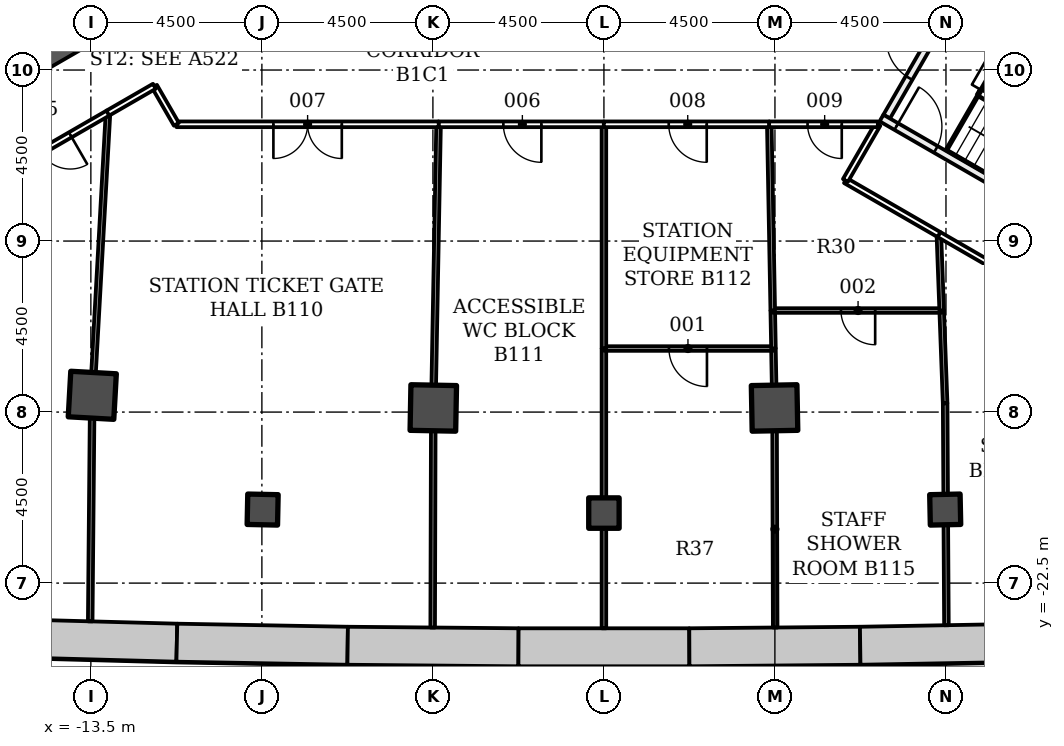
"""IFC4 building model, lengths in metres.
Left out: names, types, materials, properties, quantities, classifications, styles, units other than length and angle.
Written with IfcOpenShell. Run it as: python <this file> out.ifc"""

import sys

from ifc_helpers import new_model, si_unit, direction, frame, frame_2d, origin, origin_2d, place, context, subcontext, project, spatial, polyline, rectangle, outline, extrude, element, fill, save


model = new_model("IFC4")
c1 = context("Model", 3, precision=1e-05, world=origin(), true_north=direction((0.0, 1.0)))
c2 = subcontext(c1, "Body", "Model", "MODEL_VIEW")
j1 = project(units=[si_unit("LENGTHUNIT", "METRE"), si_unit("PLANEANGLEUNIT", "RADIAN")], contexts=[c1])
p1 = place(None, origin())
s1 = spatial("IfcSite", under=j1, at=p1, CompositionType="ELEMENT")
p2 = place(p1, origin())
s2 = spatial("IfcBuilding", under=s1, at=p2, CompositionType="ELEMENT")
p3 = place(p2, frame((0.0, 0.0, -4.5)))
s3 = spatial("IfcBuildingStorey", under=s2, at=p3, CompositionType="ELEMENT", Elevation=-4.5)
p4 = place(p3, origin())
e1 = element("IfcWall", 1, at=p4, inside=s3, PredefinedType="SOLIDWALL", context=c2, shape_type="SweptSolid", body=[
    extrude(outline(polyline([(-15.747, -24.446), (-11.249, -24.568), (-11.227, -23.568), (-15.716, -23.447), (-15.747, -24.446)])), origin(), (0.0, 0.0, 1.0), 4.25),
])
p5 = place(p3, origin())
e2 = element("IfcWall", 2, at=p5, inside=s3, PredefinedType="SOLIDWALL", context=c2, shape_type="SweptSolid", body=[
    extrude(outline(polyline([(-11.249, -24.568), (-6.75, -24.648), (-6.736, -23.649), (-11.227, -23.568), (-11.249, -24.568)])), origin(), (0.0, 0.0, 1.0), 4.25),
])
p6 = place(p3, origin())
e3 = element("IfcWall", 3, at=p6, inside=s3, PredefinedType="SOLIDWALL", context=c2, shape_type="SweptSolid", body=[
    extrude(outline(polyline([(-6.75, -24.648), (-2.25, -24.689), (-2.246, -23.689), (-6.736, -23.649), (-6.75, -24.648)])), origin(), (0.0, 0.0, 1.0), 4.25),
])
p7 = place(p3, origin())
e4 = element("IfcWall", 4, at=p7, inside=s3, PredefinedType="SOLIDWALL", context=c2, shape_type="SweptSolid", body=[
    extrude(outline(polyline([(-2.25, -24.689), (2.25, -24.689), (2.246, -23.689), (-2.246, -23.689), (-2.25, -24.689)])), origin(), (0.0, 0.0, 1.0), 4.25),
])
p8 = place(p3, origin())
e5 = element("IfcWall", 5, at=p8, inside=s3, PredefinedType="SOLIDWALL", context=c2, shape_type="SweptSolid", body=[
    extrude(outline(polyline([(2.25, -24.689), (6.75, -24.648), (6.736, -23.649), (2.246, -23.689), (2.25, -24.689)])), origin(), (0.0, 0.0, 1.0), 4.25),
])
p9 = place(p3, origin())
e6 = element("IfcWall", 6, at=p9, inside=s3, PredefinedType="SOLIDWALL", context=c2, shape_type="SweptSolid", body=[
    extrude(outline(polyline([(6.75, -24.648), (11.249, -24.568), (11.227, -23.568), (6.736, -23.649), (6.75, -24.648)])), origin(), (0.0, 0.0, 1.0), 4.25),
])
for number, where, z_axis, x_axis in (
    (7, (-13.462, -17.558, -0.3), (0.0, 0.0, 1.0), (-0.056, -0.998, 0.0)),
    (8, (-4.49, -17.892, -0.3), (0.0, 0.0, 1.0), (-0.019, -1.0, 0.0)),
    (9, (4.49, -17.892, -0.3), (0.0, 0.0, 1.0), (0.019, -1.0, 0.0)),
):
    element("IfcColumn", number, at=place(p3, frame(where, z_axis=z_axis, x_axis=x_axis)), inside=s3, PredefinedType="COLUMN", context=c2, shape_type="SweptSolid", body=[
        extrude(rectangle(XDim=1.2, YDim=1.2, at=origin_2d()), origin(), (0.0, 0.0, 1.0), 4.55),
    ])
for number, where, z_axis, x_axis in (
    (10, (-8.98, -20.565, -0.3), (0.0, 0.0, 1.0), (-0.021, -1.0, 0.0)),
    (11, (0.0, -20.657, -0.3), (0.0, 0.0, 1.0), (0.0, -1.0, 0.0)),
    (12, (8.98, -20.565, -0.3), (0.0, 0.0, 1.0), (0.021, -1.0, 0.0)),
):
    element("IfcColumn", number, at=place(p3, frame(where, z_axis=z_axis, x_axis=x_axis)), inside=s3, PredefinedType="COLUMN", context=c2, shape_type="SweptSolid", body=[
        extrude(rectangle(XDim=0.8, YDim=0.8, at=origin_2d()), origin(), (0.0, 0.0, 1.0), 4.55),
    ])
p10 = place(p3, frame((-9.922, -5.728, -0.3), z_axis=(0.0, 0.0, 1.0), x_axis=(-0.866028046028, -0.499995423472, 0.0)))
e13 = element("IfcWall", 13, at=p10, inside=s3, PredefinedType="SHEAR", context=c2, shape_type="SweptSolid", body=[
    extrude(rectangle(XDim=14.633, YDim=0.9, at=frame_2d((7.316, 0.0))), origin(), (0.0, 0.0, 1.0), 4.55),
])
p11 = place(p10, frame((7.35, 0.0, 0.3)))
e14 = element("IfcOpeningElement", 14, at=p11, cuts=e13, PredefinedType="OPENING", context=c2, shape_type="SweptSolid", body=[
    extrude(rectangle(XDim=1.5, YDim=2.1, at=frame_2d((0.75, 1.05))), frame((0.0, 0.46, 0.0), z_axis=(0.0, -1.0, 0.0), x_axis=(1.0, 0.0, 0.0)), (0.0, 0.0, 1.0), 0.92),
])
p12 = place(p3, frame((9.922, -5.728, -0.3), z_axis=(0.0, 0.0, 1.0), x_axis=(0.866028046028, -0.499995423472, 0.0)))
e15 = element("IfcWall", 15, at=p12, inside=s3, PredefinedType="SHEAR", context=c2, shape_type="SweptSolid", body=[
    extrude(rectangle(XDim=14.633, YDim=0.9, at=frame_2d((7.316, 0.0))), origin(), (0.0, 0.0, 1.0), 4.55),
])
p13 = place(p12, frame((7.35, 0.0, 0.3)))
e16 = element("IfcOpeningElement", 16, at=p13, cuts=e15, PredefinedType="OPENING", context=c2, shape_type="SweptSolid", body=[
    extrude(rectangle(XDim=1.5, YDim=2.1, at=frame_2d((0.75, 1.05))), frame((0.0, 0.46, 0.0), z_axis=(0.0, -1.0, 0.0), x_axis=(1.0, 0.0, 0.0)), (0.0, 0.0, 1.0), 0.92),
])
p14 = place(p3, frame((-10.43, -4.847, -0.3), z_axis=(0.0, 0.0, 1.0), x_axis=(-0.866018442252, -0.500012057535, 0.0)))
e17 = element("IfcWall", 17, at=p14, inside=s3, PredefinedType="SHEAR", context=c2, shape_type="SweptSolid", body=[
    extrude(rectangle(XDim=7.2, YDim=1.136, at=frame_2d((3.6, 0.0))), origin(), (0.0, 0.0, 1.0), 4.55),
])
p15 = place(p3, frame((7.44, -10.226, -0.3), z_axis=(0.0, 0.0, 1.0), x_axis=(0.500022077904, 0.866012656725, 0.0)))
e18 = element("IfcWall", 18, at=p15, inside=s3, PredefinedType="SHEAR", context=c2, shape_type="SweptSolid", body=[
    extrude(rectangle(XDim=3.55, YDim=0.2, at=frame_2d((1.775, 0.0))), origin(), (0.0, 0.0, 1.0), 4.55),
])
p16 = place(p15, frame((1.175, 0.0, 0.3)))
e19 = element("IfcOpeningElement", 19, at=p16, cuts=e18, PredefinedType="OPENING", context=c2, shape_type="SweptSolid", body=[
    extrude(rectangle(XDim=1.2, YDim=2.1, at=frame_2d((0.6, 1.05))), frame((0.0, 0.11, 0.0), z_axis=(0.0, -1.0, 0.0), x_axis=(1.0, 0.0, 0.0)), (0.0, 0.0, 1.0), 0.22),
])
p17 = place(p3, frame((7.304, -10.262, -0.3), z_axis=(0.0, 0.0, 1.0), x_axis=(0.866026594901, -0.49999793692, 0.0)))
e20 = element("IfcWall", 20, at=p17, inside=s3, PredefinedType="SHEAR", context=c2, shape_type="SweptSolid", body=[
    extrude(rectangle(XDim=5.6, YDim=0.2, at=frame_2d((2.8, 0.0))), origin(), (0.0, 0.0, 1.0), 4.55),
])
p18 = place(p17, frame((0.45, 0.0, 0.3)))
e21 = element("IfcOpeningElement", 21, at=p18, cuts=e20, PredefinedType="OPENING", context=c2, shape_type="SweptSolid", body=[
    extrude(rectangle(XDim=1.2, YDim=2.1, at=frame_2d((0.6, 1.05))), frame((0.0, 0.11, 0.0), z_axis=(0.0, -1.0, 0.0), x_axis=(1.0, 0.0, 0.0)), (0.0, 0.0, 1.0), 0.22),
])
p19 = place(p3, frame((9.413, -6.61, -0.3), z_axis=(0.0, 0.0, 1.0), x_axis=(0.866018442252, -0.500012057535, 0.0)))
e22 = element("IfcWall", 22, at=p19, inside=s3, PredefinedType="SHEAR", context=c2, shape_type="SweptSolid", body=[
    extrude(rectangle(XDim=7.2, YDim=1.136, at=frame_2d((3.6, 0.0))), origin(), (0.0, 0.0, 1.0), 4.55),
])
p20 = place(p3, frame((4.478, -17.291, 0.0), z_axis=(0.0, 0.0, 1.0), x_axis=(-0.018678891577, 0.999825534286, 0.0)))
e23 = element("IfcWall", 23, at=p20, inside=s3, PredefinedType="PARTITIONING", context=c2, shape_type="SweptSolid", body=[
    extrude(rectangle(XDim=0.967, YDim=0.12, at=frame_2d((0.484, 0.0))), origin(), (0.0, 0.0, 1.0), 3.638),
])
p21 = place(p3, frame((4.506, -23.669, 0.0), z_axis=(0.0, 0.0, 1.0), x_axis=(-0.00292382622, 0.999995725611, 0.0)))
e24 = element("IfcWall", 24, at=p21, inside=s3, PredefinedType="PARTITIONING", context=c2, shape_type="SweptSolid", body=[
    extrude(rectangle(XDim=5.177, YDim=0.12, at=frame_2d((2.588, 0.0))), origin(), (0.0, 0.0, 1.0), 3.633),
])
p22 = place(p3, frame((0.0, -21.057, 0.0), z_axis=(0.0, 0.0, 1.0), x_axis=(0.0, -1.0, 0.0)))
e25 = element("IfcWall", 25, at=p22, inside=s3, PredefinedType="PARTITIONING", context=c2, shape_type="SweptSolid", body=[
    extrude(rectangle(XDim=2.632, YDim=0.12, at=frame_2d((1.316, 0.0))), origin(), (0.0, 0.0, 1.0), 4.25),
])
p23 = place(p3, frame((0.0, -16.324, 0.0), z_axis=(0.0, 0.0, 1.0), x_axis=(0.0, -1.0, 0.0)))
e26 = element("IfcWall", 26, at=p23, inside=s3, PredefinedType="PARTITIONING", context=c2, shape_type="SweptSolid", body=[
    extrude(rectangle(XDim=3.933, YDim=0.12, at=frame_2d((1.967, 0.0))), origin(), (0.0, 0.0, 1.0), 3.638),
])
p24 = place(p3, frame((4.461, -16.328, 0.0), z_axis=(0.0, 0.0, 1.0), x_axis=(-1.0, 0.0, 0.0)))
e27 = element("IfcWall", 27, at=p24, inside=s3, PredefinedType="PARTITIONING", context=c2, shape_type="SweptSolid", body=[
    extrude(rectangle(XDim=4.461, YDim=0.12, at=frame_2d((2.23, 0.0))), origin(), (0.0, 0.0, 1.0), 3.638),
])
p25 = place(p24, frame((1.75, 0.0, 0.0)))
e28 = element("IfcOpeningElement", 28, at=p25, cuts=e27, PredefinedType="OPENING", context=c2, shape_type="SweptSolid", body=[
    extrude(rectangle(XDim=1.0, YDim=2.1, at=frame_2d((0.5, 1.05))), frame((0.0, 0.07, 0.0), z_axis=(0.0, -1.0, 0.0), x_axis=(1.0, 0.0, 0.0)), (0.0, 0.0, 1.0), 0.14),
])
p26 = place(p3, frame((8.992, -20.165, 0.0), z_axis=(0.0, 0.0, 1.0), x_axis=(-0.005803200997, 0.999983161287, 0.0)))
e29 = element("IfcWall", 29, at=p26, inside=s3, PredefinedType="PARTITIONING", context=c2, shape_type="SweptSolid", body=[
    extrude(rectangle(XDim=2.398, YDim=0.12, at=frame_2d((1.199, 0.0))), origin(), (0.0, 0.0, 1.0), 3.638),
])
p27 = place(p3, frame((8.978, -17.767, 0.0), z_axis=(0.0, 0.0, 1.0), x_axis=(-0.037248042069, 0.999306050898, 0.0)))
e30 = element("IfcWall", 30, at=p27, inside=s3, PredefinedType="PARTITIONING", context=c2, shape_type="SweptSolid", body=[
    extrude(rectangle(XDim=2.445, YDim=0.12, at=frame_2d((1.222, 0.0))), origin(), (0.0, 0.0, 1.0), 3.638),
])
p28 = place(p3, frame((9.012, -23.608, 0.0), z_axis=(0.0, 0.0, 1.0), x_axis=(-0.006004510691, 0.999981972763, 0.0)))
e31 = element("IfcWall", 31, at=p28, inside=s3, PredefinedType="PARTITIONING", context=c2, shape_type="SweptSolid", body=[
    extrude(rectangle(XDim=2.643, YDim=0.12, at=frame_2d((1.321, 0.0))), origin(), (0.0, 0.0, 1.0), 4.25),
])
p29 = place(p3, frame((4.442, -15.324, 0.0), z_axis=(0.0, 0.0, 1.0), x_axis=(0.018983920047, -0.999819789152, 0.0)))
e32 = element("IfcWall", 32, at=p29, inside=s3, PredefinedType="PARTITIONING", context=c2, shape_type="SweptSolid", body=[
    extrude(rectangle(XDim=1.003, YDim=0.12, at=frame_2d((0.501, 0.0))), origin(), (0.0, 0.0, 1.0), 3.638),
])
p30 = place(p3, frame((8.887, -15.328, 0.0), z_axis=(0.0, 0.0, 1.0), x_axis=(-1.0, 0.0, 0.0)))
e33 = element("IfcWall", 33, at=p30, inside=s3, PredefinedType="PARTITIONING", context=c2, shape_type="SweptSolid", body=[
    extrude(rectangle(XDim=4.445, YDim=0.12, at=frame_2d((2.223, 0.0))), origin(), (0.0, 0.0, 1.0), 3.638),
])
p31 = place(p30, frame((1.75, 0.0, 0.0)))
e34 = element("IfcOpeningElement", 34, at=p31, cuts=e33, PredefinedType="OPENING", context=c2, shape_type="SweptSolid", body=[
    extrude(rectangle(XDim=0.9, YDim=2.1, at=frame_2d((0.45, 1.05))), frame((0.0, 0.07, 0.0), z_axis=(0.0, -1.0, 0.0), x_axis=(1.0, 0.0, 0.0)), (0.0, 0.0, 1.0), 0.14),
])
p32 = place(p3, frame((8.813, -13.328, 0.0), z_axis=(0.0, 0.0, 1.0), x_axis=(0.036980062174, -0.999316003575, 0.0)))
e35 = element("IfcWall", 35, at=p32, inside=s3, PredefinedType="PARTITIONING", context=c2, shape_type="SweptSolid", body=[
    extrude(rectangle(XDim=2.0, YDim=0.12, at=frame_2d((1.0, 0.0))), origin(), (0.0, 0.0, 1.0), 3.638),
])
p33 = place(p3, frame((13.377, -15.963, 0.0), z_axis=(0.0, 0.0, 1.0), x_axis=(-0.865969754012, 0.500096375847, 0.0)))
e36 = element("IfcWall", 36, at=p33, inside=s3, PredefinedType="PARTITIONING", context=c2, shape_type="SweptSolid", body=[
    extrude(rectangle(XDim=5.275, YDim=0.15, at=frame_2d((2.637, 0.0))), origin(), (0.0, 0.0, 1.0), 3.638),
])
p34 = place(p33, frame((2.15, 0.0, 0.0)))
e37 = element("IfcOpeningElement", 37, at=p34, cuts=e36, PredefinedType="OPENING", context=c2, shape_type="SweptSolid", body=[
    extrude(rectangle(XDim=1.0, YDim=2.1, at=frame_2d((0.5, 1.05))), frame((0.0, 0.085, 0.0), z_axis=(0.0, -1.0, 0.0), x_axis=(1.0, 0.0, 0.0)), (0.0, 0.0, 1.0), 0.17),
])
p35 = place(p3, frame((-13.517, -23.506, 0.0), z_axis=(0.0, 0.0, 1.0), x_axis=(0.00917685765, 0.999957891755, 0.0)))
e38 = element("IfcWall", 38, at=p35, inside=s3, PredefinedType="PARTITIONING", context=c2, shape_type="SweptSolid", body=[
    extrude(rectangle(XDim=5.347, YDim=0.12, at=frame_2d((2.674, 0.0))), origin(), (0.0, 0.0, 1.0), 3.633),
])
p36 = place(p3, frame((-13.429, -16.96, 0.0), z_axis=(0.0, 0.0, 1.0), x_axis=(0.055551088657, 0.998455846069, 0.0)))
e39 = element("IfcWall", 39, at=p36, inside=s3, PredefinedType="PARTITIONING", context=c2, shape_type="SweptSolid", body=[
    extrude(rectangle(XDim=6.838, YDim=0.12, at=frame_2d((3.419, 0.0))), origin(), (0.0, 0.0, 1.0), 3.638),
])
p37 = place(p3, frame((-13.045, -10.13, 0.0), z_axis=(0.0, 0.0, 1.0), x_axis=(-0.866035577775, -0.499982377718, 0.0)))
e40 = element("IfcWall", 40, at=p37, inside=s3, PredefinedType="PARTITIONING", context=c2, shape_type="SweptSolid", body=[
    extrude(rectangle(XDim=4.093, YDim=0.15, at=frame_2d((2.046, 0.0))), origin(), (0.0, 0.0, 1.0), 3.638),
])
p38 = place(p37, frame((1.15, 0.0, 0.0)))
e41 = element("IfcOpeningElement", 41, at=p38, cuts=e40, PredefinedType="OPENING", context=c2, shape_type="SweptSolid", body=[
    extrude(rectangle(XDim=1.8, YDim=2.1, at=frame_2d((0.9, 1.05))), frame((0.0, 0.085, 0.0), z_axis=(0.0, -1.0, 0.0), x_axis=(1.0, 0.0, 0.0)), (0.0, 0.0, 1.0), 0.17),
])
p39 = place(p3, frame((-4.491, -18.492, 0.0), z_axis=(0.0, 0.0, 1.0), x_axis=(-0.00292382622, -0.999995725611, 0.0)))
e42 = element("IfcWall", 42, at=p39, inside=s3, PredefinedType="PARTITIONING", context=c2, shape_type="SweptSolid", body=[
    extrude(rectangle(XDim=5.177, YDim=0.12, at=frame_2d((2.588, 0.0))), origin(), (0.0, 0.0, 1.0), 3.633),
])
p40 = place(p3, frame((-4.351, -10.429, 0.0), z_axis=(0.0, 0.0, 1.0), x_axis=(-0.018497563981, -0.999828905427, 0.0)))
e43 = element("IfcWall", 43, at=p40, inside=s3, PredefinedType="PARTITIONING", context=c2, shape_type="SweptSolid", body=[
    extrude(rectangle(XDim=6.863, YDim=0.12, at=frame_2d((3.432, 0.0))), origin(), (0.0, 0.0, 1.0), 3.638),
])
p41 = place(p3, frame((0.0, -16.328, 0.0), z_axis=(0.0, 0.0, 1.0), x_axis=(0.0, 1.0, 0.0)))
e44 = element("IfcWall", 44, at=p41, inside=s3, PredefinedType="PARTITIONING", context=c2, shape_type="SweptSolid", body=[
    extrude(rectangle(XDim=5.9, YDim=0.12, at=frame_2d((2.95, 0.0))), origin(), (0.0, 0.0, 1.0), 3.638),
])
p42 = place(p3, frame((0.004, -10.428, 0.0), z_axis=(0.0, 0.0, 1.0), x_axis=(-1.0, 0.0, 0.0)))
e45 = element("IfcWall", 45, at=p42, inside=s3, PredefinedType="PARTITIONING", context=c2, shape_type="SweptSolid", body=[
    extrude(rectangle(XDim=4.359, YDim=0.15, at=frame_2d((2.179, 0.0))), origin(), (0.0, 0.0, 1.0), 3.638),
])
p43 = place(p42, frame((1.65, 0.0, 0.0)))
e46 = element("IfcOpeningElement", 46, at=p43, cuts=e45, PredefinedType="OPENING", context=c2, shape_type="SweptSolid", body=[
    extrude(rectangle(XDim=1.0, YDim=2.1, at=frame_2d((0.5, 1.05))), frame((0.0, 0.085, 0.0), z_axis=(0.0, -1.0, 0.0), x_axis=(1.0, 0.0, 0.0)), (0.0, 0.0, 1.0), 0.17),
])
p44 = place(p3, frame((-4.347, -10.428, 0.0), z_axis=(0.0, 0.0, 1.0), x_axis=(-1.0, 0.0, 0.0)))
e47 = element("IfcWall", 47, at=p44, inside=s3, PredefinedType="PARTITIONING", context=c2, shape_type="SweptSolid", body=[
    extrude(rectangle(XDim=6.902, YDim=0.15, at=frame_2d((3.451, 0.0))), origin(), (0.0, 0.0, 1.0), 3.638),
])
p45 = place(p44, frame((2.55, 0.0, 0.0)))
e48 = element("IfcOpeningElement", 48, at=p45, cuts=e47, PredefinedType="OPENING", context=c2, shape_type="SweptSolid", body=[
    extrude(rectangle(XDim=1.8, YDim=2.1, at=frame_2d((0.9, 1.05))), frame((0.0, 0.085, 0.0), z_axis=(0.0, -1.0, 0.0), x_axis=(1.0, 0.0, 0.0)), (0.0, 0.0, 1.0), 0.17),
])
p46 = place(p3, frame((-11.249, -10.428, 0.0), z_axis=(0.0, 0.0, 1.0), x_axis=(-0.499978438088, 0.866037852202, 0.0)))
e49 = element("IfcWall", 49, at=p46, inside=s3, PredefinedType="PARTITIONING", context=c2, shape_type="SweptSolid", body=[
    extrude(rectangle(XDim=1.156, YDim=0.15, at=frame_2d((0.578, 0.0))), origin(), (0.0, 0.0, 1.0), 4.25),
])
p47 = place(p3, frame((-11.828, -9.427, 0.0), z_axis=(0.0, 0.0, 1.0), x_axis=(-0.866110865696, -0.499851946404, 0.0)))
e50 = element("IfcWall", 50, at=p47, inside=s3, PredefinedType="PARTITIONING", context=c2, shape_type="SweptSolid", body=[
    extrude(rectangle(XDim=1.415, YDim=0.15, at=frame_2d((0.707, 0.0))), origin(), (0.0, 0.0, 1.0), 3.638),
])
p48 = place(p3, frame((4.442, -15.327, 0.0), z_axis=(0.0, 0.0, 1.0), x_axis=(-0.018539331325, 0.999828131828, 0.0)))
e51 = element("IfcWall", 51, at=p48, inside=s3, PredefinedType="PARTITIONING", context=c2, shape_type="SweptSolid", body=[
    extrude(rectangle(XDim=4.899, YDim=0.12, at=frame_2d((2.449, 0.0))), origin(), (0.0, 0.0, 1.0), 3.638),
])
p49 = place(p3, frame((4.355, -10.428, 0.0), z_axis=(0.0, 0.0, 1.0), x_axis=(-1.0, 0.0, 0.0)))
e52 = element("IfcWall", 52, at=p49, inside=s3, PredefinedType="PARTITIONING", context=c2, shape_type="SweptSolid", body=[
    extrude(rectangle(XDim=4.359, YDim=0.15, at=frame_2d((2.179, 0.0))), origin(), (0.0, 0.0, 1.0), 3.638),
])
p50 = place(p49, frame((1.65, 0.0, 0.0)))
e53 = element("IfcOpeningElement", 53, at=p50, cuts=e52, PredefinedType="OPENING", context=c2, shape_type="SweptSolid", body=[
    extrude(rectangle(XDim=1.0, YDim=2.1, at=frame_2d((0.5, 1.05))), frame((0.0, 0.085, 0.0), z_axis=(0.0, -1.0, 0.0), x_axis=(1.0, 0.0, 0.0)), (0.0, 0.0, 1.0), 0.17),
])
p51 = place(p3, frame((8.817, -13.33, 0.0), z_axis=(0.0, 0.0, 1.0), x_axis=(-0.865999736111, 0.50004445508, 0.0)))
e54 = element("IfcWall", 54, at=p51, inside=s3, PredefinedType="PARTITIONING", context=c2, shape_type="SweptSolid", body=[
    extrude(rectangle(XDim=2.844, YDim=0.15, at=frame_2d((1.422, 0.0))), origin(), (0.0, 0.0, 1.0), 3.638),
])
p52 = place(p3, frame((6.354, -11.906, 0.0), z_axis=(0.0, 0.0, 1.0), x_axis=(0.500539815233, 0.865713516913, 0.0)))
e55 = element("IfcWall", 55, at=p52, inside=s3, PredefinedType="PARTITIONING", context=c2, shape_type="SweptSolid", body=[
    extrude(rectangle(XDim=1.706, YDim=0.15, at=frame_2d((0.853, 0.0))), origin(), (0.0, 0.0, 1.0), 4.25),
])
p53 = place(p3, frame((7.208, -10.428, 0.0), z_axis=(0.0, 0.0, 1.0), x_axis=(-1.0, 0.0, 0.0)))
e56 = element("IfcWall", 56, at=p53, inside=s3, PredefinedType="PARTITIONING", context=c2, shape_type="SweptSolid", body=[
    extrude(rectangle(XDim=2.861, YDim=0.15, at=frame_2d((1.431, 0.0))), origin(), (0.0, 0.0, 1.0), 3.638),
])
p54 = place(p53, frame((0.95, 0.0, 0.0)))
e57 = element("IfcOpeningElement", 57, at=p54, cuts=e56, PredefinedType="OPENING", context=c2, shape_type="SweptSolid", body=[
    extrude(rectangle(XDim=0.9, YDim=2.1, at=frame_2d((0.45, 1.05))), frame((0.0, 0.085, 0.0), z_axis=(0.0, -1.0, 0.0), x_axis=(1.0, 0.0, 0.0)), (0.0, 0.0, 1.0), 0.17),
])
p55 = place(p16, origin())
e58 = element("IfcDoor", 58, at=p55, inside=s3, OperationType="SINGLE_SWING_RIGHT", PredefinedType="DOOR", context=c2, shape_type="SweptSolid", body=[
    extrude(rectangle(XDim=1.2, YDim=2.1, at=frame_2d((0.6, 1.05))), frame((0.0, 0.025, 0.0), z_axis=(0.0, -1.0, 0.0), x_axis=(1.0, 0.0, 0.0)), (0.0, 0.0, 1.0), 0.05),
])
fill(e19, e58)
p56 = place(p18, origin())
e59 = element("IfcDoor", 59, at=p56, inside=s3, OperationType="SINGLE_SWING_LEFT", PredefinedType="DOOR", context=c2, shape_type="SweptSolid", body=[
    extrude(rectangle(XDim=1.2, YDim=2.1, at=frame_2d((0.6, 1.05))), frame((0.0, 0.025, 0.0), z_axis=(0.0, -1.0, 0.0), x_axis=(1.0, 0.0, 0.0)), (0.0, 0.0, 1.0), 0.05),
])
fill(e21, e59)
p57 = place(p25, origin())
e60 = element("IfcDoor", 60, at=p57, inside=s3, OperationType="SINGLE_SWING_RIGHT", PredefinedType="DOOR", context=c2, shape_type="SweptSolid", body=[
    extrude(rectangle(XDim=1.0, YDim=2.1, at=frame_2d((0.5, 1.05))), frame((0.0, 0.025, 0.0), z_axis=(0.0, -1.0, 0.0), x_axis=(1.0, 0.0, 0.0)), (0.0, 0.0, 1.0), 0.05),
])
fill(e28, e60)
p58 = place(p31, origin())
e61 = element("IfcDoor", 61, at=p58, inside=s3, OperationType="SINGLE_SWING_LEFT", PredefinedType="DOOR", context=c2, shape_type="SweptSolid", body=[
    extrude(rectangle(XDim=0.9, YDim=2.1, at=frame_2d((0.45, 1.05))), frame((0.0, 0.025, 0.0), z_axis=(0.0, -1.0, 0.0), x_axis=(1.0, 0.0, 0.0)), (0.0, 0.0, 1.0), 0.05),
])
fill(e34, e61)
p59 = place(p38, origin())
e62 = element("IfcDoor", 62, at=p59, inside=s3, OperationType="DOUBLE_DOOR_SINGLE_SWING", PredefinedType="DOOR", context=c2, shape_type="SweptSolid", body=[
    extrude(rectangle(XDim=1.8, YDim=2.1, at=frame_2d((0.9, 1.05))), frame((0.0, 0.025, 0.0), z_axis=(0.0, -1.0, 0.0), x_axis=(1.0, 0.0, 0.0)), (0.0, 0.0, 1.0), 0.05),
])
fill(e41, e62)
p60 = place(p43, origin())
e63 = element("IfcDoor", 63, at=p60, inside=s3, OperationType="SINGLE_SWING_LEFT", PredefinedType="DOOR", context=c2, shape_type="SweptSolid", body=[
    extrude(rectangle(XDim=1.0, YDim=2.1, at=frame_2d((0.5, 1.05))), frame((0.0, 0.025, 0.0), z_axis=(0.0, -1.0, 0.0), x_axis=(1.0, 0.0, 0.0)), (0.0, 0.0, 1.0), 0.05),
])
fill(e46, e63)
p61 = place(p45, origin())
e64 = element("IfcDoor", 64, at=p61, inside=s3, OperationType="DOUBLE_DOOR_SINGLE_SWING", PredefinedType="DOOR", context=c2, shape_type="SweptSolid", body=[
    extrude(rectangle(XDim=1.8, YDim=2.1, at=frame_2d((0.9, 1.05))), frame((0.0, 0.025, 0.0), z_axis=(0.0, -1.0, 0.0), x_axis=(1.0, 0.0, 0.0)), (0.0, 0.0, 1.0), 0.05),
])
fill(e48, e64)
p62 = place(p50, origin())
e65 = element("IfcDoor", 65, at=p62, inside=s3, OperationType="SINGLE_SWING_LEFT", PredefinedType="DOOR", context=c2, shape_type="SweptSolid", body=[
    extrude(rectangle(XDim=1.0, YDim=2.1, at=frame_2d((0.5, 1.05))), frame((0.0, 0.025, 0.0), z_axis=(0.0, -1.0, 0.0), x_axis=(1.0, 0.0, 0.0)), (0.0, 0.0, 1.0), 0.05),
])
fill(e53, e65)
p63 = place(p54, origin())
e66 = element("IfcDoor", 66, at=p63, inside=s3, OperationType="SINGLE_SWING_LEFT", PredefinedType="DOOR", context=c2, shape_type="SweptSolid", body=[
    extrude(rectangle(XDim=0.9, YDim=2.1, at=frame_2d((0.45, 1.05))), frame((0.0, 0.025, 0.0), z_axis=(0.0, -1.0, 0.0), x_axis=(1.0, 0.0, 0.0)), (0.0, 0.0, 1.0), 0.05),
])
fill(e57, e66)
save(model, sys.argv[1])
